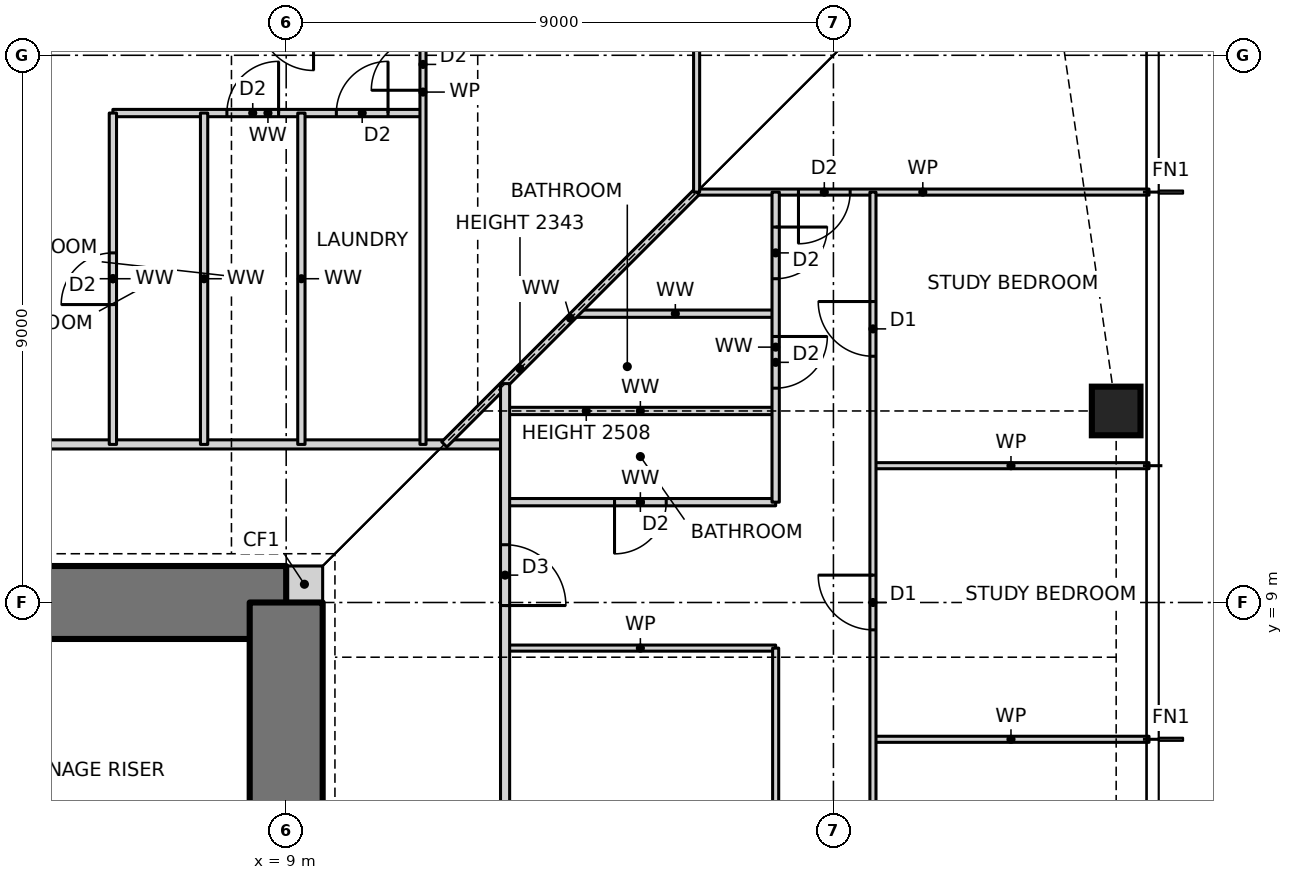
"""IFC4 building model, lengths in metres.
Left out: names, types, materials, properties, quantities, classifications, styles, units other than length and angle.
Written with IfcOpenShell. Run it as: python <this file> out.ifc"""

import sys

from ifc_helpers import new_model, si_unit, direction, frame, frame_2d, origin, origin_2d, place, context, subcontext, project, spatial, rectangle, hollow_rectangle, extrude, element, fill, save


model = new_model("IFC4")
c1 = context("Model", 3, precision=1e-05, world=origin(), true_north=direction((0.0, 1.0)))
c2 = subcontext(c1, "Body", "Model", "MODEL_VIEW")
j1 = project(units=[si_unit("LENGTHUNIT", "METRE"), si_unit("PLANEANGLEUNIT", "RADIAN")], contexts=[c1])
p1 = place(None, origin())
s1 = spatial("IfcSite", under=j1, at=p1, CompositionType="ELEMENT")
p2 = place(p1, origin())
s2 = spatial("IfcBuilding", under=s1, at=p2, CompositionType="ELEMENT")
p3 = place(p2, frame((0.0, 0.0, 32.5)))
s3 = spatial("IfcBuildingStorey", under=s2, at=p3, CompositionType="ELEMENT", Elevation=32.5)
p4 = place(p3, frame((22.65, 12.15, 0.0), z_axis=(0.0, 0.0, 1.0), x_axis=(1.0, 0.0, 0.0)))
e1 = element("IfcColumn", 1, at=p4, inside=s3, PredefinedType="COLUMN", context=c2, shape_type="SweptSolid", body=[
    extrude(hollow_rectangle(XDim=0.8, YDim=0.8, WallThickness=0.09, at=origin_2d()), origin(), (0.0, 0.0, 1.0), 3.5),
])
p5 = place(p3, frame((9.0, 9.3, 0.0), z_axis=(0.0, 0.0, 1.0), x_axis=(1.0, 0.0, 0.0)))
e2 = element("IfcWall", 2, at=p5, inside=s3, PredefinedType="SOLIDWALL", context=c2, shape_type="SweptSolid", body=[
    extrude(rectangle(XDim=0.6, YDim=0.6, at=frame_2d((0.3, 0.0))), origin(), (0.0, 0.0, 1.0), 3.5),
])
p6 = place(p3, frame((9.0, 9.0, 0.0), z_axis=(0.0, 0.0, 1.0), x_axis=(-1.0, 0.0, 0.0)))
e3 = element("IfcWall", 3, at=p6, inside=s3, PredefinedType="SHEAR", context=c2, shape_type="SweptSolid", body=[
    extrude(rectangle(XDim=18.0, YDim=1.2, at=frame_2d((9.0, 0.0))), origin(), (0.0, 0.0, 1.0), 3.5),
])
p7 = place(p6, frame((11.125, 0.0, 0.0)))
e4 = element("IfcOpeningElement", 4, at=p7, cuts=e3, PredefinedType="OPENING", context=c2, shape_type="SweptSolid", body=[
    extrude(rectangle(XDim=0.9, YDim=2.1, at=frame_2d((0.45, 1.05))), frame((0.0, 0.61, 0.0), z_axis=(0.0, -1.0, 0.0), x_axis=(1.0, 0.0, 0.0)), (0.0, 0.0, 1.0), 1.22),
])
p8 = place(p6, frame((4.275, 0.0, 0.0)))
e5 = element("IfcOpeningElement", 5, at=p8, cuts=e3, PredefinedType="OPENING", context=c2, shape_type="SweptSolid", body=[
    extrude(rectangle(XDim=0.9, YDim=2.1, at=frame_2d((0.45, 1.05))), frame((0.0, 0.61, 0.0), z_axis=(0.0, -1.0, 0.0), x_axis=(1.0, 0.0, 0.0)), (0.0, 0.0, 1.0), 1.22),
])
p9 = place(p3, frame((9.0, -9.0, 0.0), z_axis=(0.0, 0.0, 1.0), x_axis=(0.0, 1.0, 0.0)))
e6 = element("IfcWall", 6, at=p9, inside=s3, PredefinedType="SHEAR", context=c2, shape_type="SweptSolid", body=[
    extrude(rectangle(XDim=18.0, YDim=1.2, at=frame_2d((9.0, 0.0))), origin(), (0.0, 0.0, 1.0), 3.5),
])
p10 = place(p9, frame((8.5, 0.0, 0.0)))
e7 = element("IfcOpeningElement", 7, at=p10, cuts=e6, PredefinedType="OPENING", context=c2, shape_type="SweptSolid", body=[
    extrude(rectangle(XDim=1.0, YDim=2.1, at=frame_2d((0.5, 1.05))), frame((0.0, 0.61, 0.0), z_axis=(0.0, -1.0, 0.0), x_axis=(1.0, 0.0, 0.0)), (0.0, 0.0, 1.0), 1.22),
])
p11 = place(p3, frame((18.65, 6.75, 0.0), z_axis=(0.0, 0.0, 1.0), x_axis=(1.0, 0.0, 0.0)))
e8 = element("IfcWall", 8, at=p11, inside=s3, PredefinedType="PARTITIONING", context=c2, shape_type="SweptSolid", body=[
    extrude(rectangle(XDim=4.54, YDim=0.1, at=frame_2d((2.27, 0.0))), origin(), (0.0, 0.0, 1.0), 3.27),
])
p12 = place(p3, frame((12.6, 8.25, 0.0), z_axis=(0.0, 0.0, 1.0), x_axis=(1.0, 0.0, 0.0)))
e9 = element("IfcWall", 9, at=p12, inside=s3, PredefinedType="PARTITIONING", context=c2, shape_type="SweptSolid", body=[
    extrude(rectangle(XDim=4.45, YDim=0.1, at=frame_2d((2.225, 0.0))), origin(), (0.0, 0.0, 1.0), 3.27),
])
p13 = place(p3, frame((12.6, 10.65, 0.0), z_axis=(0.0, 0.0, 1.0), x_axis=(1.0, 0.0, 0.0)))
e10 = element("IfcWall", 10, at=p13, inside=s3, PredefinedType="PARTITIONING", context=c2, shape_type="SweptSolid", body=[
    extrude(rectangle(XDim=4.45, YDim=0.12, at=frame_2d((2.225, 0.0))), origin(), (0.0, 0.0, 1.0), 3.27),
])
p14 = place(p13, frame((1.8, 0.0, 0.0)))
e11 = element("IfcOpeningElement", 11, at=p14, cuts=e10, PredefinedType="OPENING", context=c2, shape_type="SweptSolid", body=[
    extrude(rectangle(XDim=0.85, YDim=2.1, at=frame_2d((0.425, 1.05))), frame((0.0, 0.07, 0.0), z_axis=(0.0, -1.0, 0.0), x_axis=(1.0, 0.0, 0.0)), (0.0, 0.0, 1.0), 0.14),
])
p15 = place(p3, frame((18.65, 11.25, 0.0), z_axis=(0.0, 0.0, 1.0), x_axis=(1.0, 0.0, 0.0)))
e12 = element("IfcWall", 12, at=p15, inside=s3, PredefinedType="PARTITIONING", context=c2, shape_type="SweptSolid", body=[
    extrude(rectangle(XDim=4.54, YDim=0.1, at=frame_2d((2.27, 0.0))), origin(), (0.0, 0.0, 1.0), 3.27),
])
p16 = place(p3, frame((-11.6, 11.6, 0.0), z_axis=(0.0, 0.0, 1.0), x_axis=(1.0, 0.0, 0.0)))
e13 = element("IfcWall", 13, at=p16, inside=s3, PredefinedType="PARTITIONING", context=c2, shape_type="SweptSolid", body=[
    extrude(rectangle(XDim=24.2, YDim=0.15, at=frame_2d((12.1, 0.0))), origin(), (0.0, 0.0, 1.0), 3.27),
])
p17 = place(p16, frame((12.855, 0.0, 0.0)))
e14 = element("IfcOpeningElement", 14, at=p17, cuts=e13, PredefinedType="OPENING", context=c2, shape_type="SweptSolid", body=[
    extrude(rectangle(XDim=1.0, YDim=2.1, at=frame_2d((0.5, 1.05))), frame((0.0, 0.085, 0.0), z_axis=(0.0, -1.0, 0.0), x_axis=(1.0, 0.0, 0.0)), (0.0, 0.0, 1.0), 0.17),
])
p18 = place(p3, frame((12.6, 12.15, 0.0), z_axis=(0.0, 0.0, 1.0), x_axis=(1.0, 0.0, 0.0)))
e15 = element("IfcWall", 15, at=p18, inside=s3, PredefinedType="PARTITIONING", context=c2, shape_type="SweptSolid", body=[
    extrude(rectangle(XDim=4.45, YDim=0.12, at=frame_2d((2.225, 0.0))), origin(), (0.0, 0.0, 1.0), 2.508),
])
p19 = place(p3, frame((13.75, 13.75, 0.0), z_axis=(0.0, 0.0, 1.0), x_axis=(1.0, 0.0, 0.0)))
e16 = element("IfcWall", 16, at=p19, inside=s3, PredefinedType="PARTITIONING", context=c2, shape_type="SweptSolid", body=[
    extrude(rectangle(XDim=3.3, YDim=0.12, at=frame_2d((1.65, 0.0))), origin(), (0.0, 0.0, 1.0), 3.27),
])
p20 = place(p3, frame((15.75, 15.75, 0.0), z_axis=(0.0, 0.0, 1.0), x_axis=(1.0, 0.0, 0.0)))
e17 = element("IfcWall", 17, at=p20, inside=s3, PredefinedType="PARTITIONING", context=c2, shape_type="SweptSolid", body=[
    extrude(rectangle(XDim=7.44, YDim=0.1, at=frame_2d((3.72, 0.0))), origin(), (0.0, 0.0, 1.0), 3.27),
])
p21 = place(p20, frame((1.675, 0.0, 0.0)))
e18 = element("IfcOpeningElement", 18, at=p21, cuts=e17, PredefinedType="OPENING", context=c2, shape_type="SweptSolid", body=[
    extrude(rectangle(XDim=0.85, YDim=2.1, at=frame_2d((0.425, 1.05))), frame((0.0, 0.06, 0.0), z_axis=(0.0, -1.0, 0.0), x_axis=(1.0, 0.0, 0.0)), (0.0, 0.0, 1.0), 0.12),
])
p22 = place(p3, frame((6.15, 17.05, 0.0), z_axis=(0.0, 0.0, 1.0), x_axis=(1.0, 0.0, 0.0)))
e19 = element("IfcWall", 19, at=p22, inside=s3, PredefinedType="PARTITIONING", context=c2, shape_type="SweptSolid", body=[
    extrude(rectangle(XDim=5.1, YDim=0.12, at=frame_2d((2.55, 0.0))), origin(), (0.0, 0.0, 1.0), 3.27),
])
p23 = place(p22, frame((3.675, 0.0, 0.0)))
e20 = element("IfcOpeningElement", 20, at=p23, cuts=e19, PredefinedType="OPENING", context=c2, shape_type="SweptSolid", body=[
    extrude(rectangle(XDim=0.85, YDim=2.1, at=frame_2d((0.425, 1.05))), frame((0.0, 0.07, 0.0), z_axis=(0.0, -1.0, 0.0), x_axis=(1.0, 0.0, 0.0)), (0.0, 0.0, 1.0), 0.14),
])
p24 = place(p22, frame((1.875, 0.0, 0.0)))
e21 = element("IfcOpeningElement", 21, at=p24, cuts=e19, PredefinedType="OPENING", context=c2, shape_type="SweptSolid", body=[
    extrude(rectangle(XDim=0.85, YDim=2.1, at=frame_2d((0.425, 1.05))), frame((0.0, 0.07, 0.0), z_axis=(0.0, -1.0, 0.0), x_axis=(1.0, 0.0, 0.0)), (0.0, 0.0, 1.0), 0.14),
])
p25 = place(p3, frame((11.6, 11.6, 0.0), z_axis=(0.0, 0.0, 1.0), x_axis=(0.707106781187, 0.707106781187, 0.0)))
e22 = element("IfcWall", 22, at=p25, inside=s3, PredefinedType="PARTITIONING", context=c2, shape_type="SweptSolid", body=[
    extrude(rectangle(XDim=5.869, YDim=0.12, at=frame_2d((2.935, 0.0))), origin(), (0.0, 0.0, 1.0), 2.343),
])
p26 = place(p3, frame((18.65, -15.75, 0.0), z_axis=(0.0, 0.0, 1.0), x_axis=(0.0, 1.0, 0.0)))
e23 = element("IfcWall", 23, at=p26, inside=s3, PredefinedType="PARTITIONING", context=c2, shape_type="SweptSolid", body=[
    extrude(rectangle(XDim=31.5, YDim=0.1, at=frame_2d((15.75, 0.0))), origin(), (0.0, 0.0, 1.0), 3.27),
])
p27 = place(p26, frame((1.8, 0.0, 0.0)))
e24 = element("IfcOpeningElement", 24, at=p27, cuts=e23, PredefinedType="OPENING", context=c2, shape_type="SweptSolid", body=[
    extrude(rectangle(XDim=0.9, YDim=2.1, at=frame_2d((0.45, 1.05))), frame((0.0, 0.06, 0.0), z_axis=(0.0, -1.0, 0.0), x_axis=(1.0, 0.0, 0.0)), (0.0, 0.0, 1.0), 0.12),
])
p28 = place(p26, frame((6.3, 0.0, 0.0)))
e25 = element("IfcOpeningElement", 25, at=p28, cuts=e23, PredefinedType="OPENING", context=c2, shape_type="SweptSolid", body=[
    extrude(rectangle(XDim=0.9, YDim=2.1, at=frame_2d((0.45, 1.05))), frame((0.0, 0.06, 0.0), z_axis=(0.0, -1.0, 0.0), x_axis=(1.0, 0.0, 0.0)), (0.0, 0.0, 1.0), 0.12),
])
p29 = place(p26, frame((10.8, 0.0, 0.0)))
e26 = element("IfcOpeningElement", 26, at=p29, cuts=e23, PredefinedType="OPENING", context=c2, shape_type="SweptSolid", body=[
    extrude(rectangle(XDim=0.9, YDim=2.1, at=frame_2d((0.45, 1.05))), frame((0.0, 0.06, 0.0), z_axis=(0.0, -1.0, 0.0), x_axis=(1.0, 0.0, 0.0)), (0.0, 0.0, 1.0), 0.12),
])
p30 = place(p26, frame((15.3, 0.0, 0.0)))
e27 = element("IfcOpeningElement", 27, at=p30, cuts=e23, PredefinedType="OPENING", context=c2, shape_type="SweptSolid", body=[
    extrude(rectangle(XDim=0.9, YDim=2.1, at=frame_2d((0.45, 1.05))), frame((0.0, 0.06, 0.0), z_axis=(0.0, -1.0, 0.0), x_axis=(1.0, 0.0, 0.0)), (0.0, 0.0, 1.0), 0.12),
])
p31 = place(p26, frame((19.8, 0.0, 0.0)))
e28 = element("IfcOpeningElement", 28, at=p31, cuts=e23, PredefinedType="OPENING", context=c2, shape_type="SweptSolid", body=[
    extrude(rectangle(XDim=0.9, YDim=2.1, at=frame_2d((0.45, 1.05))), frame((0.0, 0.06, 0.0), z_axis=(0.0, -1.0, 0.0), x_axis=(1.0, 0.0, 0.0)), (0.0, 0.0, 1.0), 0.12),
])
p32 = place(p26, frame((24.3, 0.0, 0.0)))
e29 = element("IfcOpeningElement", 29, at=p32, cuts=e23, PredefinedType="OPENING", context=c2, shape_type="SweptSolid", body=[
    extrude(rectangle(XDim=0.9, YDim=2.1, at=frame_2d((0.45, 1.05))), frame((0.0, 0.06, 0.0), z_axis=(0.0, -1.0, 0.0), x_axis=(1.0, 0.0, 0.0)), (0.0, 0.0, 1.0), 0.12),
])
p33 = place(p26, frame((28.8, 0.0, 0.0)))
e30 = element("IfcOpeningElement", 30, at=p33, cuts=e23, PredefinedType="OPENING", context=c2, shape_type="SweptSolid", body=[
    extrude(rectangle(XDim=0.9, YDim=2.1, at=frame_2d((0.45, 1.05))), frame((0.0, 0.06, 0.0), z_axis=(0.0, -1.0, 0.0), x_axis=(1.0, 0.0, 0.0)), (0.0, 0.0, 1.0), 0.12),
])
p34 = place(p3, frame((17.05, -11.95, 0.0), z_axis=(0.0, 0.0, 1.0), x_axis=(0.0, 1.0, 0.0)))
e31 = element("IfcWall", 31, at=p34, inside=s3, PredefinedType="PARTITIONING", context=c2, shape_type="SweptSolid", body=[
    extrude(rectangle(XDim=20.2, YDim=0.1, at=frame_2d((10.1, 0.0))), origin(), (0.0, 0.0, 1.0), 3.27),
])
p35 = place(p34, frame((9.675, 0.0, 0.0)))
e32 = element("IfcOpeningElement", 32, at=p35, cuts=e31, PredefinedType="OPENING", context=c2, shape_type="SweptSolid", body=[
    extrude(rectangle(XDim=0.85, YDim=2.1, at=frame_2d((0.425, 1.05))), frame((0.0, 0.06, 0.0), z_axis=(0.0, -1.0, 0.0), x_axis=(1.0, 0.0, 0.0)), (0.0, 0.0, 1.0), 0.12),
])
p36 = place(p3, frame((17.05, 10.65, 0.0), z_axis=(0.0, 0.0, 1.0), x_axis=(0.0, 1.0, 0.0)))
e33 = element("IfcWall", 33, at=p36, inside=s3, PredefinedType="PARTITIONING", context=c2, shape_type="SweptSolid", body=[
    extrude(rectangle(XDim=5.1, YDim=0.12, at=frame_2d((2.55, 0.0))), origin(), (0.0, 0.0, 1.0), 3.27),
])
p37 = place(p36, frame((1.875, 0.0, 0.0)))
e34 = element("IfcOpeningElement", 34, at=p37, cuts=e33, PredefinedType="OPENING", context=c2, shape_type="SweptSolid", body=[
    extrude(rectangle(XDim=0.85, YDim=2.1, at=frame_2d((0.425, 1.05))), frame((0.0, 0.07, 0.0), z_axis=(0.0, -1.0, 0.0), x_axis=(1.0, 0.0, 0.0)), (0.0, 0.0, 1.0), 0.14),
])
p38 = place(p36, frame((3.675, 0.0, 0.0)))
e35 = element("IfcOpeningElement", 35, at=p38, cuts=e33, PredefinedType="OPENING", context=c2, shape_type="SweptSolid", body=[
    extrude(rectangle(XDim=0.85, YDim=2.1, at=frame_2d((0.425, 1.05))), frame((0.0, 0.07, 0.0), z_axis=(0.0, -1.0, 0.0), x_axis=(1.0, 0.0, 0.0)), (0.0, 0.0, 1.0), 0.14),
])
p39 = place(p3, frame((15.75, 15.75, 0.0), z_axis=(0.0, 0.0, 1.0), x_axis=(0.0, 1.0, 0.0)))
e36 = element("IfcWall", 36, at=p39, inside=s3, PredefinedType="PARTITIONING", context=c2, shape_type="SweptSolid", body=[
    extrude(rectangle(XDim=7.44, YDim=0.1, at=frame_2d((3.72, 0.0))), origin(), (0.0, 0.0, 1.0), 3.27),
])
p40 = place(p3, frame((12.6, -12.6, 0.0), z_axis=(0.0, 0.0, 1.0), x_axis=(0.0, 1.0, 0.0)))
e37 = element("IfcWall", 37, at=p40, inside=s3, PredefinedType="PARTITIONING", context=c2, shape_type="SweptSolid", body=[
    extrude(rectangle(XDim=25.2, YDim=0.15, at=frame_2d((12.6, 0.0))), origin(), (0.0, 0.0, 1.0), 3.27),
])
p41 = place(p40, frame((21.55, 0.0, 0.0)))
e38 = element("IfcOpeningElement", 38, at=p41, cuts=e37, PredefinedType="OPENING", context=c2, shape_type="SweptSolid", body=[
    extrude(rectangle(XDim=1.0, YDim=2.1, at=frame_2d((0.5, 1.05))), frame((0.0, 0.085, 0.0), z_axis=(0.0, -1.0, 0.0), x_axis=(1.0, 0.0, 0.0)), (0.0, 0.0, 1.0), 0.17),
])
p42 = place(p3, frame((11.25, 11.6, 0.0), z_axis=(0.0, 0.0, 1.0), x_axis=(0.0, 1.0, 0.0)))
e39 = element("IfcWall", 39, at=p42, inside=s3, PredefinedType="PARTITIONING", context=c2, shape_type="SweptSolid", body=[
    extrude(rectangle(XDim=11.59, YDim=0.1, at=frame_2d((5.795, 0.0))), origin(), (0.0, 0.0, 1.0), 3.27),
])
p43 = place(p42, frame((5.825, 0.0, 0.0)))
e40 = element("IfcOpeningElement", 40, at=p43, cuts=e39, PredefinedType="OPENING", context=c2, shape_type="SweptSolid", body=[
    extrude(rectangle(XDim=0.85, YDim=2.1, at=frame_2d((0.425, 1.05))), frame((0.0, 0.06, 0.0), z_axis=(0.0, -1.0, 0.0), x_axis=(1.0, 0.0, 0.0)), (0.0, 0.0, 1.0), 0.12),
])
for number, where, z_axis, x_axis in (
    (41, (9.25, 11.6, 0.0), (0.0, 0.0, 1.0), (0.0, 1.0, 0.0)),
    (42, (7.65, 11.6, 0.0), (0.0, 0.0, 1.0), (0.0, 1.0, 0.0)),
):
    element("IfcWall", number, at=place(p3, frame(where, z_axis=z_axis, x_axis=x_axis)), inside=s3, PredefinedType="PARTITIONING", context=c2, shape_type="SweptSolid", body=[
        extrude(rectangle(XDim=5.45, YDim=0.12, at=frame_2d((2.725, 0.0))), origin(), (0.0, 0.0, 1.0), 3.27),
    ])
p44 = place(p3, frame((6.15, 11.6, 0.0), z_axis=(0.0, 0.0, 1.0), x_axis=(0.0, 1.0, 0.0)))
e43 = element("IfcWall", 43, at=p44, inside=s3, PredefinedType="PARTITIONING", context=c2, shape_type="SweptSolid", body=[
    extrude(rectangle(XDim=5.45, YDim=0.12, at=frame_2d((2.725, 0.0))), origin(), (0.0, 0.0, 1.0), 3.27),
])
p45 = place(p44, frame((2.3, 0.0, 0.0)))
e44 = element("IfcOpeningElement", 44, at=p45, cuts=e43, PredefinedType="OPENING", context=c2, shape_type="SweptSolid", body=[
    extrude(rectangle(XDim=0.85, YDim=2.1, at=frame_2d((0.425, 1.05))), frame((0.0, 0.07, 0.0), z_axis=(0.0, -1.0, 0.0), x_axis=(1.0, 0.0, 0.0)), (0.0, 0.0, 1.0), 0.14),
])
p46 = place(p32, origin())
e45 = element("IfcDoor", 45, at=p46, inside=s3, OperationType="SINGLE_SWING_RIGHT", PredefinedType="DOOR", context=c2, shape_type="SweptSolid", body=[
    extrude(rectangle(XDim=0.9, YDim=2.1, at=frame_2d((0.45, 1.05))), frame((0.0, 0.025, 0.0), z_axis=(0.0, -1.0, 0.0), x_axis=(1.0, 0.0, 0.0)), (0.0, 0.0, 1.0), 0.05),
])
fill(e29, e45)
p47 = place(p33, origin())
e46 = element("IfcDoor", 46, at=p47, inside=s3, OperationType="SINGLE_SWING_RIGHT", PredefinedType="DOOR", context=c2, shape_type="SweptSolid", body=[
    extrude(rectangle(XDim=0.9, YDim=2.1, at=frame_2d((0.45, 1.05))), frame((0.0, 0.025, 0.0), z_axis=(0.0, -1.0, 0.0), x_axis=(1.0, 0.0, 0.0)), (0.0, 0.0, 1.0), 0.05),
])
fill(e30, e46)
p48 = place(p41, frame((1.0, 0.0, 0.0), z_axis=(0.0, 0.0, 1.0), x_axis=(-1.0, 0.0, 0.0)))
e47 = element("IfcDoor", 47, at=p48, inside=s3, OperationType="SINGLE_SWING_RIGHT", PredefinedType="DOOR", context=c2, shape_type="SweptSolid", body=[
    extrude(rectangle(XDim=1.0, YDim=2.1, at=frame_2d((0.5, 1.05))), frame((0.0, 0.025, 0.0), z_axis=(0.0, -1.0, 0.0), x_axis=(1.0, 0.0, 0.0)), (0.0, 0.0, 1.0), 0.05),
])
fill(e38, e47)
p49 = place(p14, frame((0.85, 0.0, 0.0), z_axis=(0.0, 0.0, 1.0), x_axis=(-1.0, 0.0, 0.0)))
e48 = element("IfcDoor", 48, at=p49, inside=s3, OperationType="SINGLE_SWING_RIGHT", PredefinedType="DOOR", context=c2, shape_type="SweptSolid", body=[
    extrude(rectangle(XDim=0.85, YDim=2.1, at=frame_2d((0.425, 1.05))), frame((0.0, 0.025, 0.0), z_axis=(0.0, -1.0, 0.0), x_axis=(1.0, 0.0, 0.0)), (0.0, 0.0, 1.0), 0.05),
])
fill(e11, e48)
p50 = place(p37, frame((0.85, 0.0, 0.0), z_axis=(0.0, 0.0, 1.0), x_axis=(-1.0, 0.0, 0.0)))
e49 = element("IfcDoor", 49, at=p50, inside=s3, OperationType="SINGLE_SWING_LEFT", PredefinedType="DOOR", context=c2, shape_type="SweptSolid", body=[
    extrude(rectangle(XDim=0.85, YDim=2.1, at=frame_2d((0.425, 1.05))), frame((0.0, 0.025, 0.0), z_axis=(0.0, -1.0, 0.0), x_axis=(1.0, 0.0, 0.0)), (0.0, 0.0, 1.0), 0.05),
])
fill(e34, e49)
p51 = place(p38, frame((0.85, 0.0, 0.0), z_axis=(0.0, 0.0, 1.0), x_axis=(-1.0, 0.0, 0.0)))
e50 = element("IfcDoor", 50, at=p51, inside=s3, OperationType="SINGLE_SWING_LEFT", PredefinedType="DOOR", context=c2, shape_type="SweptSolid", body=[
    extrude(rectangle(XDim=0.85, YDim=2.1, at=frame_2d((0.425, 1.05))), frame((0.0, 0.025, 0.0), z_axis=(0.0, -1.0, 0.0), x_axis=(1.0, 0.0, 0.0)), (0.0, 0.0, 1.0), 0.05),
])
fill(e35, e50)
p52 = place(p43, origin())
e51 = element("IfcDoor", 51, at=p52, inside=s3, OperationType="SINGLE_SWING_LEFT", PredefinedType="DOOR", context=c2, shape_type="SweptSolid", body=[
    extrude(rectangle(XDim=0.85, YDim=2.1, at=frame_2d((0.425, 1.05))), frame((0.0, 0.025, 0.0), z_axis=(0.0, -1.0, 0.0), x_axis=(1.0, 0.0, 0.0)), (0.0, 0.0, 1.0), 0.05),
])
fill(e40, e51)
p53 = place(p23, origin())
e52 = element("IfcDoor", 52, at=p53, inside=s3, OperationType="SINGLE_SWING_RIGHT", PredefinedType="DOOR", context=c2, shape_type="SweptSolid", body=[
    extrude(rectangle(XDim=0.85, YDim=2.1, at=frame_2d((0.425, 1.05))), frame((0.0, 0.025, 0.0), z_axis=(0.0, -1.0, 0.0), x_axis=(1.0, 0.0, 0.0)), (0.0, 0.0, 1.0), 0.05),
])
fill(e20, e52)
p54 = place(p24, origin())
e53 = element("IfcDoor", 53, at=p54, inside=s3, OperationType="SINGLE_SWING_RIGHT", PredefinedType="DOOR", context=c2, shape_type="SweptSolid", body=[
    extrude(rectangle(XDim=0.85, YDim=2.1, at=frame_2d((0.425, 1.05))), frame((0.0, 0.025, 0.0), z_axis=(0.0, -1.0, 0.0), x_axis=(1.0, 0.0, 0.0)), (0.0, 0.0, 1.0), 0.05),
])
fill(e21, e53)
p55 = place(p45, origin())
e54 = element("IfcDoor", 54, at=p55, inside=s3, OperationType="SINGLE_SWING_LEFT", PredefinedType="DOOR", context=c2, shape_type="SweptSolid", body=[
    extrude(rectangle(XDim=0.85, YDim=2.1, at=frame_2d((0.425, 1.05))), frame((0.0, 0.025, 0.0), z_axis=(0.0, -1.0, 0.0), x_axis=(1.0, 0.0, 0.0)), (0.0, 0.0, 1.0), 0.05),
])
fill(e44, e54)
p56 = place(p21, frame((0.85, 0.0, 0.0), z_axis=(0.0, 0.0, 1.0), x_axis=(-1.0, 0.0, 0.0)))
e55 = element("IfcDoor", 55, at=p56, inside=s3, OperationType="SINGLE_SWING_RIGHT", PredefinedType="DOOR", context=c2, shape_type="SweptSolid", body=[
    extrude(rectangle(XDim=0.85, YDim=2.1, at=frame_2d((0.425, 1.05))), frame((0.0, 0.025, 0.0), z_axis=(0.0, -1.0, 0.0), x_axis=(1.0, 0.0, 0.0)), (0.0, 0.0, 1.0), 0.05),
])
fill(e18, e55)
save(model, sys.argv[1])
